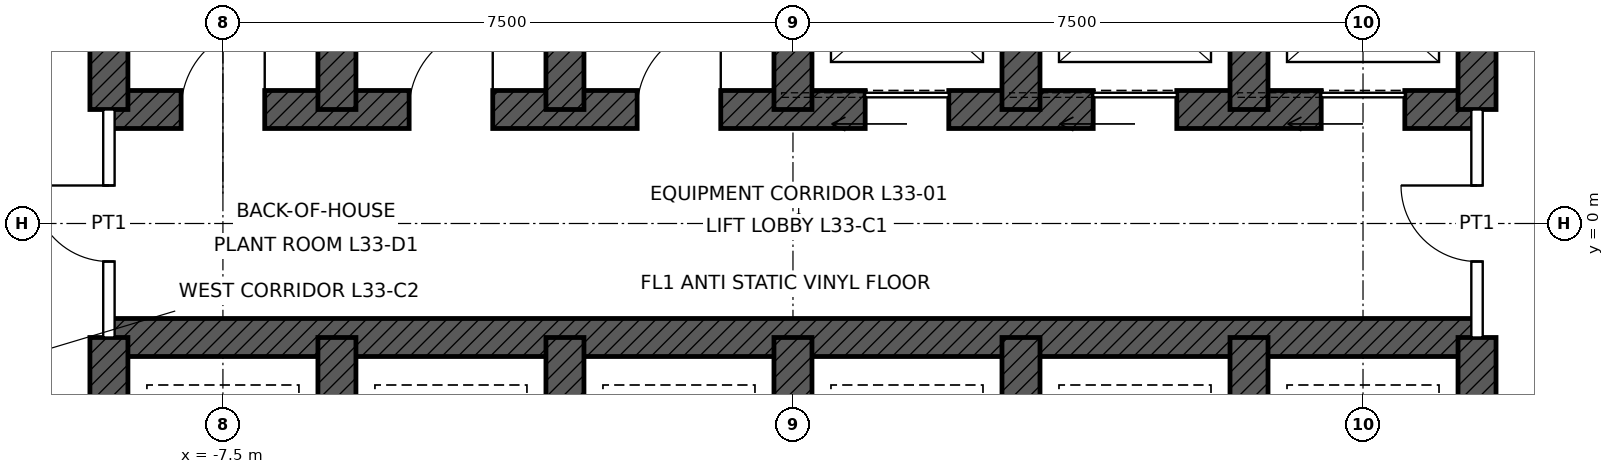
"""IFC4 building model, lengths in metres.
Left out: names, types, materials, properties, quantities, classifications, styles, units other than length and angle.
Written with IfcOpenShell. Run it as: python <this file> out.ifc"""

import sys

from ifc_helpers import new_model, si_unit, direction, frame, frame_2d, origin, place, context, subcontext, project, spatial, rectangle, extrude, element, fill, save


model = new_model("IFC4")
c1 = context("Model", 3, precision=1e-05, world=origin(), true_north=direction((0.0, 1.0)))
c2 = subcontext(c1, "Body", "Model", "MODEL_VIEW")
j1 = project(units=[si_unit("LENGTHUNIT", "METRE"), si_unit("PLANEANGLEUNIT", "RADIAN")], contexts=[c1])
p1 = place(None, origin())
s1 = spatial("IfcSite", under=j1, at=p1, CompositionType="ELEMENT")
p2 = place(p1, origin())
s2 = spatial("IfcBuilding", under=s1, at=p2, CompositionType="ELEMENT")
p3 = place(p2, frame((0.0, 0.0, 162.9)))
s3 = spatial("IfcBuildingStorey", under=s2, at=p3, CompositionType="ELEMENT", Elevation=162.9)
p4 = place(p3, frame((-9.0, 1.5, 0.0), z_axis=(0.0, 0.0, 1.0), x_axis=(1.0, 0.0, 0.0)))
e1 = element("IfcWall", 1, at=p4, inside=s3, PredefinedType="SHEAR", context=c2, shape_type="SweptSolid", body=[
    extrude(rectangle(XDim=18.0, YDim=0.5, at=frame_2d((9.0, 0.0))), origin(), (0.0, 0.0, 1.0), 4.5),
])
p5 = place(p4, frame((9.95, 0.0, 0.0)))
e2 = element("IfcOpeningElement", 2, at=p5, cuts=e1, PredefinedType="OPENING", context=c2, shape_type="SweptSolid", body=[
    extrude(rectangle(XDim=1.1, YDim=2.1, at=frame_2d((0.55, 1.05))), frame((0.0, 0.26, 0.0), z_axis=(0.0, -1.0, 0.0), x_axis=(1.0, 0.0, 0.0)), (0.0, 0.0, 1.0), 0.52),
])
p6 = place(p4, frame((12.95, 0.0, 0.0)))
e3 = element("IfcOpeningElement", 3, at=p6, cuts=e1, PredefinedType="OPENING", context=c2, shape_type="SweptSolid", body=[
    extrude(rectangle(XDim=1.1, YDim=2.1, at=frame_2d((0.55, 1.05))), frame((0.0, 0.26, 0.0), z_axis=(0.0, -1.0, 0.0), x_axis=(1.0, 0.0, 0.0)), (0.0, 0.0, 1.0), 0.52),
])
p7 = place(p4, frame((15.95, 0.0, 0.0)))
e4 = element("IfcOpeningElement", 4, at=p7, cuts=e1, PredefinedType="OPENING", context=c2, shape_type="SweptSolid", body=[
    extrude(rectangle(XDim=1.1, YDim=2.1, at=frame_2d((0.55, 1.05))), frame((0.0, 0.26, 0.0), z_axis=(0.0, -1.0, 0.0), x_axis=(1.0, 0.0, 0.0)), (0.0, 0.0, 1.0), 0.52),
])
p8 = place(p4, frame((0.95, 0.0, 0.0)))
e5 = element("IfcOpeningElement", 5, at=p8, cuts=e1, PredefinedType="OPENING", context=c2, shape_type="SweptSolid", body=[
    extrude(rectangle(XDim=1.1, YDim=2.1, at=frame_2d((0.55, 1.05))), frame((0.0, 0.26, 0.0), z_axis=(0.0, -1.0, 0.0), x_axis=(1.0, 0.0, 0.0)), (0.0, 0.0, 1.0), 0.52),
])
p9 = place(p4, frame((3.95, 0.0, 0.0)))
e6 = element("IfcOpeningElement", 6, at=p9, cuts=e1, PredefinedType="OPENING", context=c2, shape_type="SweptSolid", body=[
    extrude(rectangle(XDim=1.1, YDim=2.1, at=frame_2d((0.55, 1.05))), frame((0.0, 0.26, 0.0), z_axis=(0.0, -1.0, 0.0), x_axis=(1.0, 0.0, 0.0)), (0.0, 0.0, 1.0), 0.52),
])
p10 = place(p4, frame((6.95, 0.0, 0.0)))
e7 = element("IfcOpeningElement", 7, at=p10, cuts=e1, PredefinedType="OPENING", context=c2, shape_type="SweptSolid", body=[
    extrude(rectangle(XDim=1.1, YDim=2.1, at=frame_2d((0.55, 1.05))), frame((0.0, 0.26, 0.0), z_axis=(0.0, -1.0, 0.0), x_axis=(1.0, 0.0, 0.0)), (0.0, 0.0, 1.0), 0.52),
])
p11 = place(p3, frame((-9.0, -1.5, 0.0), z_axis=(0.0, 0.0, 1.0), x_axis=(1.0, 0.0, 0.0)))
e8 = element("IfcWall", 8, at=p11, inside=s3, PredefinedType="SHEAR", context=c2, shape_type="SweptSolid", body=[
    extrude(rectangle(XDim=18.0, YDim=0.5, at=frame_2d((9.0, 0.0))), origin(), (0.0, 0.0, 1.0), 4.5),
])
for number, where, z_axis, x_axis in (
    (9, (-9.0, 1.5, 0.0), (0.0, 0.0, 1.0), (0.0, 1.0, 0.0)),
    (10, (9.0, 1.5, 0.0), (0.0, 0.0, 1.0), (0.0, 1.0, 0.0)),
    (11, (-9.0, -4.5, 0.0), (0.0, 0.0, 1.0), (0.0, 1.0, 0.0)),
    (12, (9.0, -4.5, 0.0), (0.0, 0.0, 1.0), (0.0, 1.0, 0.0)),
    (13, (-6.0, 1.5, 0.0), (0.0, 0.0, 1.0), (0.0, 1.0, 0.0)),
    (14, (-3.0, 1.5, 0.0), (0.0, 0.0, 1.0), (0.0, 1.0, 0.0)),
    (15, (0.0, 1.5, 0.0), (0.0, 0.0, 1.0), (0.0, 1.0, 0.0)),
    (16, (3.0, 1.5, 0.0), (0.0, 0.0, 1.0), (0.0, 1.0, 0.0)),
    (17, (6.0, 1.5, 0.0), (0.0, 0.0, 1.0), (0.0, 1.0, 0.0)),
    (18, (-6.0, -4.5, 0.0), (0.0, 0.0, 1.0), (0.0, 1.0, 0.0)),
    (19, (-3.0, -4.5, 0.0), (0.0, 0.0, 1.0), (0.0, 1.0, 0.0)),
    (20, (0.0, -4.5, 0.0), (0.0, 0.0, 1.0), (0.0, 1.0, 0.0)),
    (21, (3.0, -4.5, 0.0), (0.0, 0.0, 1.0), (0.0, 1.0, 0.0)),
    (22, (6.0, -4.5, 0.0), (0.0, 0.0, 1.0), (0.0, 1.0, 0.0)),
):
    element("IfcWall", number, at=place(p3, frame(where, z_axis=z_axis, x_axis=x_axis)), inside=s3, PredefinedType="SHEAR", context=c2, shape_type="SweptSolid", body=[
        extrude(rectangle(XDim=3.0, YDim=0.5, at=frame_2d((1.5, 0.0))), origin(), (0.0, 0.0, 1.0), 4.5),
    ])
p12 = place(p3, frame((-9.0, -1.5, 0.0), z_axis=(0.0, 0.0, 1.0), x_axis=(0.0, 1.0, 0.0)))
e23 = element("IfcWall", 23, at=p12, inside=s3, PredefinedType="PARTITIONING", context=c2, shape_type="SweptSolid", body=[
    extrude(rectangle(XDim=3.0, YDim=0.15, at=frame_2d((1.5, 0.0))), origin(), (0.0, 0.0, 1.0), 4.25),
])
p13 = place(p12, frame((1.0, 0.0, 0.0)))
e24 = element("IfcOpeningElement", 24, at=p13, cuts=e23, PredefinedType="OPENING", context=c2, shape_type="SweptSolid", body=[
    extrude(rectangle(XDim=1.0, YDim=2.4, at=frame_2d((0.5, 1.2))), frame((0.0, 0.085, 0.0), z_axis=(0.0, -1.0, 0.0), x_axis=(1.0, 0.0, 0.0)), (0.0, 0.0, 1.0), 0.17),
])
p14 = place(p3, frame((9.0, -1.5, 0.0), z_axis=(0.0, 0.0, 1.0), x_axis=(0.0, 1.0, 0.0)))
e25 = element("IfcWall", 25, at=p14, inside=s3, PredefinedType="PARTITIONING", context=c2, shape_type="SweptSolid", body=[
    extrude(rectangle(XDim=3.0, YDim=0.15, at=frame_2d((1.5, 0.0))), origin(), (0.0, 0.0, 1.0), 4.25),
])
p15 = place(p14, frame((1.0, 0.0, 0.0)))
e26 = element("IfcOpeningElement", 26, at=p15, cuts=e25, PredefinedType="OPENING", context=c2, shape_type="SweptSolid", body=[
    extrude(rectangle(XDim=1.0, YDim=2.4, at=frame_2d((0.5, 1.2))), frame((0.0, 0.085, 0.0), z_axis=(0.0, -1.0, 0.0), x_axis=(1.0, 0.0, 0.0)), (0.0, 0.0, 1.0), 0.17),
])
p16 = place(p5, origin())
e27 = element("IfcDoor", 27, at=p16, inside=s3, OperationType="SLIDING_TO_LEFT", PredefinedType="DOOR", context=c2, shape_type="SweptSolid", body=[
    extrude(rectangle(XDim=1.1, YDim=2.1, at=frame_2d((0.55, 1.05))), frame((0.0, 0.025, 0.0), z_axis=(0.0, -1.0, 0.0), x_axis=(1.0, 0.0, 0.0)), (0.0, 0.0, 1.0), 0.05),
])
fill(e2, e27)
p17 = place(p6, origin())
e28 = element("IfcDoor", 28, at=p17, inside=s3, OperationType="SLIDING_TO_LEFT", PredefinedType="DOOR", context=c2, shape_type="SweptSolid", body=[
    extrude(rectangle(XDim=1.1, YDim=2.1, at=frame_2d((0.55, 1.05))), frame((0.0, 0.025, 0.0), z_axis=(0.0, -1.0, 0.0), x_axis=(1.0, 0.0, 0.0)), (0.0, 0.0, 1.0), 0.05),
])
fill(e3, e28)
p18 = place(p7, origin())
e29 = element("IfcDoor", 29, at=p18, inside=s3, OperationType="SLIDING_TO_LEFT", PredefinedType="DOOR", context=c2, shape_type="SweptSolid", body=[
    extrude(rectangle(XDim=1.1, YDim=2.1, at=frame_2d((0.55, 1.05))), frame((0.0, 0.025, 0.0), z_axis=(0.0, -1.0, 0.0), x_axis=(1.0, 0.0, 0.0)), (0.0, 0.0, 1.0), 0.05),
])
fill(e4, e29)
p19 = place(p13, origin())
e30 = element("IfcDoor", 30, at=p19, inside=s3, OperationType="SINGLE_SWING_RIGHT", PredefinedType="DOOR", context=c2, shape_type="SweptSolid", body=[
    extrude(rectangle(XDim=1.0, YDim=2.4, at=frame_2d((0.5, 1.2))), frame((0.0, 0.025, 0.0), z_axis=(0.0, -1.0, 0.0), x_axis=(1.0, 0.0, 0.0)), (0.0, 0.0, 1.0), 0.05),
])
fill(e24, e30)
p20 = place(p15, origin())
e31 = element("IfcDoor", 31, at=p20, inside=s3, OperationType="SINGLE_SWING_RIGHT", PredefinedType="DOOR", context=c2, shape_type="SweptSolid", body=[
    extrude(rectangle(XDim=1.0, YDim=2.4, at=frame_2d((0.5, 1.2))), frame((0.0, 0.025, 0.0), z_axis=(0.0, -1.0, 0.0), x_axis=(1.0, 0.0, 0.0)), (0.0, 0.0, 1.0), 0.05),
])
fill(e26, e31)
p21 = place(p8, origin())
e32 = element("IfcDoor", 32, at=p21, inside=s3, OperationType="SINGLE_SWING_RIGHT", PredefinedType="DOOR", context=c2, shape_type="SweptSolid", body=[
    extrude(rectangle(XDim=1.1, YDim=2.1, at=frame_2d((0.55, 1.05))), frame((0.0, 0.025, 0.0), z_axis=(0.0, -1.0, 0.0), x_axis=(1.0, 0.0, 0.0)), (0.0, 0.0, 1.0), 0.05),
])
fill(e5, e32)
p22 = place(p9, origin())
e33 = element("IfcDoor", 33, at=p22, inside=s3, OperationType="SINGLE_SWING_RIGHT", PredefinedType="DOOR", context=c2, shape_type="SweptSolid", body=[
    extrude(rectangle(XDim=1.1, YDim=2.1, at=frame_2d((0.55, 1.05))), frame((0.0, 0.025, 0.0), z_axis=(0.0, -1.0, 0.0), x_axis=(1.0, 0.0, 0.0)), (0.0, 0.0, 1.0), 0.05),
])
fill(e6, e33)
p23 = place(p10, origin())
e34 = element("IfcDoor", 34, at=p23, inside=s3, OperationType="SINGLE_SWING_RIGHT", PredefinedType="DOOR", context=c2, shape_type="SweptSolid", body=[
    extrude(rectangle(XDim=1.1, YDim=2.1, at=frame_2d((0.55, 1.05))), frame((0.0, 0.025, 0.0), z_axis=(0.0, -1.0, 0.0), x_axis=(1.0, 0.0, 0.0)), (0.0, 0.0, 1.0), 0.05),
])
fill(e7, e34)
save(model, sys.argv[1])
